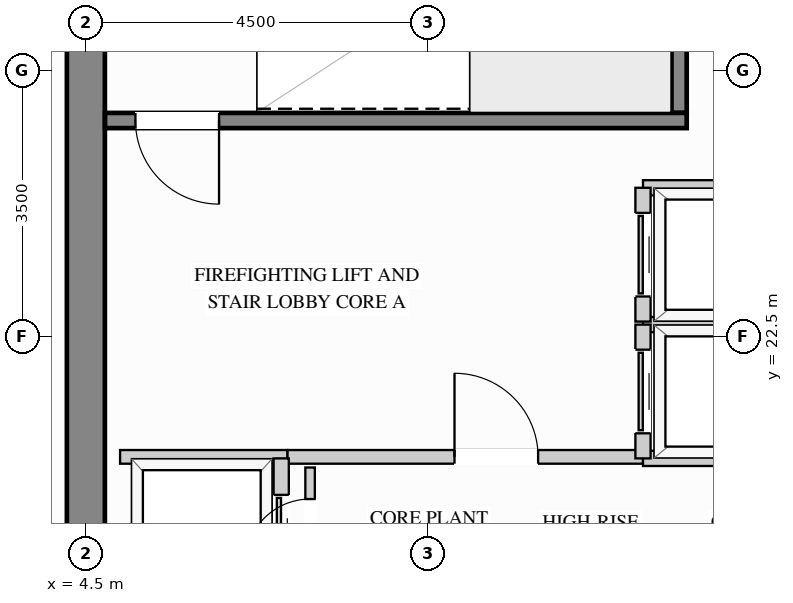
"""IFC4 building model, lengths in metres.
Left out: names, types, materials, properties, quantities, classifications, styles, units other than length and angle.
Written with IfcOpenShell. Run it as: python <this file> out.ifc"""

import sys

from ifc_helpers import new_model, si_unit, direction, frame, frame_2d, origin, place, context, subcontext, project, spatial, rectangle, extrude, source, transform, mapped, element, fill, save


model = new_model("IFC4")
c1 = context("Model", 3, precision=1e-05, world=origin(), true_north=direction((0.0, 1.0)))
c2 = subcontext(c1, "Body", "Model", "MODEL_VIEW")
j1 = project(units=[si_unit("LENGTHUNIT", "METRE"), si_unit("PLANEANGLEUNIT", "RADIAN")], contexts=[c1])
p1 = place(None, origin())
s1 = spatial("IfcSite", under=j1, at=p1, CompositionType="ELEMENT")
p2 = place(p1, origin())
s2 = spatial("IfcBuilding", under=s1, at=p2, CompositionType="ELEMENT")
p3 = place(p2, frame((0.0, 0.0, 241.2)))
s3 = spatial("IfcBuildingStorey", under=s2, at=p3, CompositionType="ELEMENT", Elevation=241.2)
m1 = source(origin(), c2, "Body", "SweptSolid", [
    extrude(rectangle(XDim=20.5, YDim=0.5, at=frame_2d((10.25, 0.0))), origin(), (0.0, 0.0, 1.0), 3.4),
])
p4 = place(p3, frame((4.5, 8.75, 0.0), z_axis=(0.0, 0.0, 1.0), x_axis=(0.0, 1.0, 0.0)))
e1 = element("IfcWall", 1, at=p4, inside=s3, PredefinedType="SHEAR", context=c2, shape_type="MappedRepresentation", body=[
    mapped(m1, transform((0.0, 0.0, 0.0), x_axis=(1.0, 0.0, 0.0), y_axis=(0.0, 1.0, 0.0), z_axis=(0.0, 0.0, 1.0))),
])
p5 = place(p3, frame((7.15, 20.92, 0.0), z_axis=(0.0, 0.0, 1.0), x_axis=(1.0, 0.0, 0.0)))
e2 = element("IfcWall", 2, at=p5, inside=s3, PredefinedType="PARTITIONING", context=c2, shape_type="SweptSolid", body=[
    extrude(rectangle(XDim=4.68, YDim=0.18, at=frame_2d((2.34, 0.0))), origin(), (0.0, 0.0, 1.0), 3.385),
])
p6 = place(p5, frame((2.2, 0.0, 0.0)))
e3 = element("IfcOpeningElement", 3, at=p6, cuts=e2, PredefinedType="OPENING", context=c2, shape_type="SweptSolid", body=[
    extrude(rectangle(XDim=1.1, YDim=2.15, at=frame_2d((0.55, 1.075))), frame((0.0, 0.1, 0.0), z_axis=(0.0, -1.0, 0.0), x_axis=(1.0, 0.0, 0.0)), (0.0, 0.0, 1.0), 0.2),
])
m2 = source(origin(), c2, "Body", "SweptSolid", [
    extrude(rectangle(XDim=2.2, YDim=0.18, at=frame_2d((1.1, 0.0))), origin(), (0.0, 0.0, 1.0), 3.385),
])
p7 = place(p3, frame((4.95, 20.92, 0.0), z_axis=(0.0, 0.0, 1.0), x_axis=(1.0, 0.0, 0.0)))
e4 = element("IfcWall", 4, at=p7, inside=s3, PredefinedType="PARTITIONING", context=c2, shape_type="MappedRepresentation", body=[
    mapped(m2, transform((0.0, 0.0, 0.0), x_axis=(1.0, 0.0, 0.0), y_axis=(0.0, 1.0, 0.0), z_axis=(0.0, 0.0, 1.0))),
])
p8 = place(p3, frame((7.45, 19.2, 0.0), z_axis=(0.0, 0.0, 1.0), x_axis=(0.0, 1.0, 0.0)))
e5 = element("IfcWall", 5, at=p8, inside=s3, PredefinedType="PARTITIONING", context=c2, shape_type="SweptSolid", body=[
    extrude(rectangle(XDim=1.58, YDim=0.125, at=frame_2d((0.79, 0.0))), origin(), (0.0, 0.0, 1.0), 3.385),
])
p9 = place(p8, frame((0.315, 0.0, 0.0)))
e6 = element("IfcOpeningElement", 6, at=p9, cuts=e5, PredefinedType="OPENING", context=c2, shape_type="SweptSolid", body=[
    extrude(rectangle(XDim=0.85, YDim=2.1, at=frame_2d((0.425, 1.05))), frame((0.0, 0.073, 0.0), z_axis=(0.0, -1.0, 0.0), x_axis=(1.0, 0.0, 0.0)), (0.0, 0.0, 1.0), 0.145),
])
m3 = source(origin(), c2, "Body", "SweptSolid", [
    extrude(rectangle(XDim=2.39, YDim=0.2, at=frame_2d((1.195, 0.0))), origin(), (0.0, 0.0, 1.0), 3.385),
])
for number, where, z_axis, x_axis in (
    (7, (11.83, 22.66, 0.0), (0.0, 0.0, 1.0), (1.0, 0.0, 0.0)),
    (8, (11.83, 20.9, 0.0), (0.0, 0.0, 1.0), (1.0, 0.0, 0.0)),
):
    element("IfcWall", number, at=place(p3, frame(where, z_axis=z_axis, x_axis=x_axis)), inside=s3, PredefinedType="PARTITIONING", context=c2, shape_type="MappedRepresentation", body=[
        mapped(m3, transform((0.0, 0.0, 0.0), x_axis=(1.0, 0.0, 0.0), y_axis=(0.0, 1.0, 0.0), z_axis=(0.0, 0.0, 1.0))),
    ])
p10 = place(p3, frame((11.83, 20.9, 0.0), z_axis=(0.0, 0.0, 1.0), x_axis=(0.0, 1.0, 0.0)))
e9 = element("IfcWall", 9, at=p10, inside=s3, PredefinedType="PARTITIONING", context=c2, shape_type="SweptSolid", body=[
    extrude(rectangle(XDim=1.76, YDim=0.2, at=frame_2d((0.88, 0.0))), origin(), (0.0, 0.0, 1.0), 3.385),
])
p11 = place(p10, frame((0.33, 0.0, 0.0)))
e10 = element("IfcOpeningElement", 10, at=p11, cuts=e9, PredefinedType="OPENING", context=c2, shape_type="SweptSolid", body=[
    extrude(rectangle(XDim=1.1, YDim=2.2, at=frame_2d((0.55, 1.1))), frame((0.0, 0.11, 0.0), z_axis=(0.0, -1.0, 0.0), x_axis=(1.0, 0.0, 0.0)), (0.0, 0.0, 1.0), 0.22),
])
p12 = place(p3, frame((11.83, 24.46, 0.0), z_axis=(0.0, 0.0, 1.0), x_axis=(1.0, 0.0, 0.0)))
e11 = element("IfcWall", 11, at=p12, inside=s3, PredefinedType="PARTITIONING", context=c2, shape_type="MappedRepresentation", body=[
    mapped(m3, transform((0.0, 0.0, 0.0), x_axis=(1.0, 0.0, 0.0), y_axis=(0.0, 1.0, 0.0), z_axis=(0.0, 0.0, 1.0))),
])
p13 = place(p3, frame((11.83, 22.7, 0.0), z_axis=(0.0, 0.0, 1.0), x_axis=(0.0, 1.0, 0.0)))
e12 = element("IfcWall", 12, at=p13, inside=s3, PredefinedType="PARTITIONING", context=c2, shape_type="SweptSolid", body=[
    extrude(rectangle(XDim=1.76, YDim=0.2, at=frame_2d((0.88, 0.0))), origin(), (0.0, 0.0, 1.0), 3.385),
])
p14 = place(p13, frame((0.33, 0.0, 0.0)))
e13 = element("IfcOpeningElement", 13, at=p14, cuts=e12, PredefinedType="OPENING", context=c2, shape_type="SweptSolid", body=[
    extrude(rectangle(XDim=1.1, YDim=2.2, at=frame_2d((0.55, 1.1))), frame((0.0, 0.11, 0.0), z_axis=(0.0, -1.0, 0.0), x_axis=(1.0, 0.0, 0.0)), (0.0, 0.0, 1.0), 0.22),
])
p15 = place(p3, frame((7.07, 18.84, 0.0), z_axis=(0.0, 0.0, 1.0), x_axis=(0.0, 1.0, 0.0)))
e14 = element("IfcWall", 14, at=p15, inside=s3, PredefinedType="PARTITIONING", context=c2, shape_type="SweptSolid", body=[
    extrude(rectangle(XDim=2.06, YDim=0.2, at=frame_2d((1.03, 0.0))), origin(), (0.0, 0.0, 1.0), 3.385),
])
p16 = place(p15, frame((0.48, 0.0, 0.0)))
e15 = element("IfcOpeningElement", 15, at=p16, cuts=e14, PredefinedType="OPENING", context=c2, shape_type="SweptSolid", body=[
    extrude(rectangle(XDim=1.1, YDim=2.2, at=frame_2d((0.55, 1.1))), frame((0.0, 0.11, 0.0), z_axis=(0.0, -1.0, 0.0), x_axis=(1.0, 0.0, 0.0)), (0.0, 0.0, 1.0), 0.22),
])
m4 = source(origin(), c2, "Body", "SweptSolid", [
    extrude(rectangle(XDim=3.803, YDim=0.2, at=frame_2d((1.901, 0.0))), origin(), (0.0, 0.0, 1.0), 3.4),
])
p17 = place(p3, frame((12.305, 25.445, 0.0), z_axis=(0.0, 0.0, 1.0), x_axis=(0.0, 1.0, 0.0)))
e16 = element("IfcWall", 16, at=p17, inside=s3, PredefinedType="SHEAR", context=c2, shape_type="MappedRepresentation", body=[
    mapped(m4, transform((0.0, 0.0, 0.0), x_axis=(1.0, 0.0, 0.0), y_axis=(0.0, 1.0, 0.0), z_axis=(0.0, 0.0, 1.0))),
])
p18 = place(p3, frame((4.752, 25.345, 0.0), z_axis=(0.0, 0.0, 1.0), x_axis=(1.0, 0.0, 0.0)))
e17 = element("IfcWall", 17, at=p18, inside=s3, PredefinedType="SHEAR", context=c2, shape_type="SweptSolid", body=[
    extrude(rectangle(XDim=7.653, YDim=0.2, at=frame_2d((3.827, 0.0))), origin(), (0.0, 0.0, 1.0), 3.4),
])
p19 = place(p18, frame((0.4, 0.0, 0.0)))
e18 = element("IfcOpeningElement", 18, at=p19, cuts=e17, PredefinedType="OPENING", context=c2, shape_type="SweptSolid", body=[
    extrude(rectangle(XDim=1.1, YDim=2.15, at=frame_2d((0.55, 1.075))), frame((0.0, 0.11, 0.0), z_axis=(0.0, -1.0, 0.0), x_axis=(1.0, 0.0, 0.0)), (0.0, 0.0, 1.0), 0.22),
])
m5 = source(origin(), c2, "Body", "SweptSolid", [
    extrude(rectangle(XDim=1.1, YDim=2.15, at=frame_2d((0.55, 1.075))), frame((0.0, 0.025, 0.0), z_axis=(0.0, -1.0, 0.0), x_axis=(1.0, 0.0, 0.0)), (0.0, 0.0, 1.0), 0.05),
])
p20 = place(p6, origin())
e19 = element("IfcDoor", 19, at=p20, inside=s3, OperationType="SINGLE_SWING_LEFT", PredefinedType="DOOR", context=c2, shape_type="MappedRepresentation", body=[
    mapped(m5, transform((0.0, 0.0, 0.0), x_axis=(1.0, 0.0, 0.0), y_axis=(0.0, 1.0, 0.0), z_axis=(0.0, 0.0, 1.0))),
])
fill(e3, e19)
m6 = source(origin(), c2, "Body", "SweptSolid", [
    extrude(rectangle(XDim=1.1, YDim=2.2, at=frame_2d((0.55, 1.1))), frame((0.0, 0.025, 0.0), z_axis=(0.0, -1.0, 0.0), x_axis=(1.0, 0.0, 0.0)), (0.0, 0.0, 1.0), 0.05),
])
p21 = place(p11, origin())
e20 = element("IfcDoor", 20, at=p21, inside=s3, OperationType="SLIDING_TO_LEFT", PredefinedType="DOOR", context=c2, shape_type="MappedRepresentation", body=[
    mapped(m6, transform((0.0, 0.0, 0.0), x_axis=(1.0, 0.0, 0.0), y_axis=(0.0, 1.0, 0.0), z_axis=(0.0, 0.0, 1.0))),
])
fill(e10, e20)
p22 = place(p14, origin())
e21 = element("IfcDoor", 21, at=p22, inside=s3, OperationType="SLIDING_TO_LEFT", PredefinedType="DOOR", context=c2, shape_type="MappedRepresentation", body=[
    mapped(m6, transform((0.0, 0.0, 0.0), x_axis=(1.0, 0.0, 0.0), y_axis=(0.0, 1.0, 0.0), z_axis=(0.0, 0.0, 1.0))),
])
fill(e13, e21)
p23 = place(p16, origin())
e22 = element("IfcDoor", 22, at=p23, inside=s3, OperationType="SLIDING_TO_LEFT", PredefinedType="DOOR", context=c2, shape_type="MappedRepresentation", body=[
    mapped(m6, transform((0.0, 0.0, 0.0), x_axis=(1.0, 0.0, 0.0), y_axis=(0.0, 1.0, 0.0), z_axis=(0.0, 0.0, 1.0))),
])
fill(e15, e22)
m7 = source(origin(), c2, "Body", "SweptSolid", [
    extrude(rectangle(XDim=0.85, YDim=2.1, at=frame_2d((0.425, 1.05))), frame((0.0, 0.025, 0.0), z_axis=(0.0, -1.0, 0.0), x_axis=(1.0, 0.0, 0.0)), (0.0, 0.0, 1.0), 0.05),
])
p24 = place(p9, origin())
e23 = element("IfcDoor", 23, at=p24, inside=s3, OperationType="SINGLE_SWING_LEFT", PredefinedType="DOOR", context=c2, shape_type="MappedRepresentation", body=[
    mapped(m7, transform((0.0, 0.0, 0.0), x_axis=(1.0, 0.0, 0.0), y_axis=(0.0, 1.0, 0.0), z_axis=(0.0, 0.0, 1.0))),
])
fill(e6, e23)
m8 = source(origin(), c2, "Body", "SweptSolid", [
    extrude(rectangle(XDim=1.1, YDim=2.15, at=frame_2d((0.55, 1.075))), frame((0.0, 0.025, 0.0), z_axis=(0.0, -1.0, 0.0), x_axis=(1.0, 0.0, 0.0)), (0.0, 0.0, 1.0), 0.05),
])
p25 = place(p19, origin())
e24 = element("IfcDoor", 24, at=p25, inside=s3, OperationType="SINGLE_SWING_RIGHT", PredefinedType="DOOR", context=c2, shape_type="MappedRepresentation", body=[
    mapped(m8, transform((0.0, 0.0, 0.0), x_axis=(1.0, 0.0, 0.0), y_axis=(0.0, 1.0, 0.0), z_axis=(0.0, 0.0, 1.0))),
])
fill(e18, e24)
save(model, sys.argv[1])
